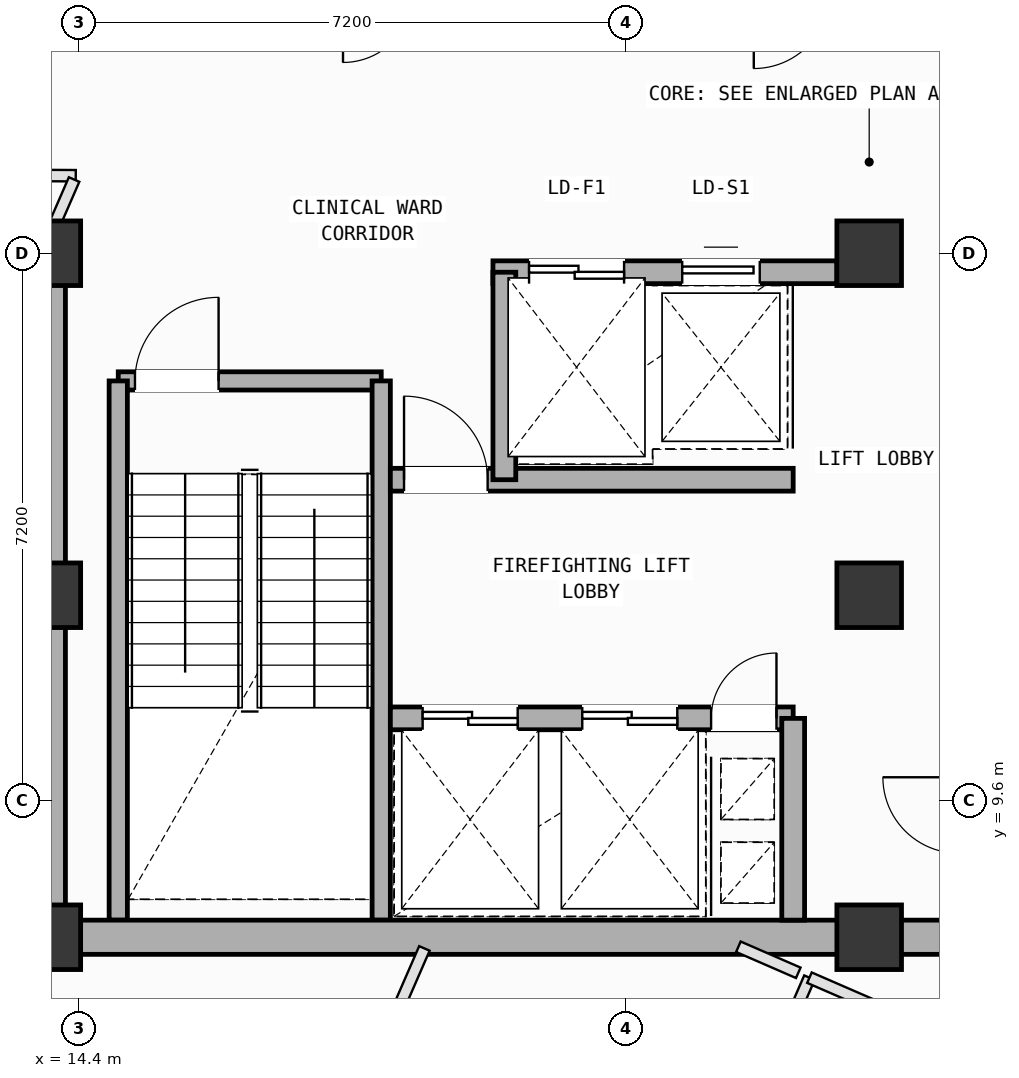
"""IFC4 building model, lengths in metres.
Left out: names, types, materials, properties, quantities, classifications, styles, units other than length and angle.
Written with IfcOpenShell. Run it as: python <this file> out.ifc"""

import sys

from ifc_helpers import new_model, si_unit, direction, frame, frame_2d, origin, origin_2d, place, context, subcontext, project, spatial, rectangle, extrude, element, fill, save


model = new_model("IFC4")
c1 = context("Model", 3, precision=1e-05, world=origin(), true_north=direction((0.0, 1.0)))
c2 = subcontext(c1, "Body", "Model", "MODEL_VIEW")
j1 = project(units=[si_unit("LENGTHUNIT", "METRE"), si_unit("PLANEANGLEUNIT", "RADIAN")], contexts=[c1])
p1 = place(None, origin())
s1 = spatial("IfcSite", under=j1, at=p1, CompositionType="ELEMENT")
p2 = place(p1, origin())
s2 = spatial("IfcBuilding", under=s1, at=p2, CompositionType="ELEMENT")
p3 = place(p2, frame((0.0, 0.0, 320.6)))
s3 = spatial("IfcBuildingStorey", under=s2, at=p3, CompositionType="ELEMENT", Elevation=320.6)
for number, where, z_axis, x_axis in (
    (1, (14.0, 7.8, 0.0), (0.0, 0.0, 1.0), (1.0, 0.0, 0.0)),
    (2, (14.0, 12.3, 0.0), (0.0, 0.0, 1.0), (1.0, 0.0, 0.0)),
    (3, (14.0, 16.8, 0.0), (0.0, 0.0, 1.0), (1.0, 0.0, 0.0)),
    (4, (24.8, 7.8, 0.0), (0.0, 0.0, 1.0), (1.0, 0.0, 0.0)),
    (5, (24.8, 12.3, 0.0), (0.0, 0.0, 1.0), (1.0, 0.0, 0.0)),
    (6, (24.8, 16.8, 0.0), (0.0, 0.0, 1.0), (1.0, 0.0, 0.0)),
):
    element("IfcColumn", number, at=place(p3, frame(where, z_axis=z_axis, x_axis=x_axis)), inside=s3, PredefinedType="COLUMN", context=c2, shape_type="SweptSolid", body=[
        extrude(rectangle(XDim=0.85, YDim=0.85, at=origin_2d()), origin(), (0.0, 0.0, 1.0), 4.0),
    ])
p4 = place(p3, frame((25.484, 21.187, 0.0), z_axis=(0.0, 0.0, 1.0), x_axis=(0.917060568388, -0.398747932794, 0.0)))
e7 = element("IfcWall", 7, at=p4, inside=s3, PredefinedType="SOLIDWALL", context=c2, shape_type="SweptSolid", body=[
    extrude(rectangle(XDim=6.955, YDim=0.28, at=frame_2d((3.478, 0.0))), origin(), (0.0, 0.0, 1.0), 2.765),
])
p5 = place(p3, frame((14.92, 15.12, 0.0), z_axis=(0.0, 0.0, 1.0), x_axis=(1.0, 0.0, 0.0)))
e8 = element("IfcWall", 8, at=p5, inside=s3, PredefinedType="SOLIDWALL", context=c2, shape_type="SweptSolid", body=[
    extrude(rectangle(XDim=3.46, YDim=0.24, at=frame_2d((1.73, 0.0))), origin(), (0.0, 0.0, 1.0), 3.78),
])
p6 = place(p5, frame((0.22, 0.0, 0.0)))
e9 = element("IfcOpeningElement", 9, at=p6, cuts=e8, PredefinedType="OPENING", context=c2, shape_type="SweptSolid", body=[
    extrude(rectangle(XDim=1.1, YDim=2.15, at=frame_2d((0.55, 1.075))), frame((0.0, 0.13, 0.0), z_axis=(0.0, -1.0, 0.0), x_axis=(1.0, 0.0, 0.0)), (0.0, 0.0, 1.0), 0.26),
])
for number, where, z_axis, x_axis in (
    (10, (18.38, 15.12, 0.0), (0.0, 0.0, 1.0), (0.0, -1.0, 0.0)),
    (11, (14.92, 8.025, 0.0), (0.0, 0.0, 1.0), (0.0, 1.0, 0.0)),
):
    element("IfcWall", number, at=place(p3, frame(where, z_axis=z_axis, x_axis=x_axis)), inside=s3, PredefinedType="SOLIDWALL", context=c2, shape_type="SweptSolid", body=[
        extrude(rectangle(XDim=7.095, YDim=0.24, at=frame_2d((3.548, 0.0))), origin(), (0.0, 0.0, 1.0), 3.78),
    ])
for number, where, z_axis, x_axis in (
    (12, (14.0, 7.8, 0.0), (0.0, 0.0, 1.0), (1.0, 0.0, 0.0)),
    (13, (24.8, 7.8, 0.0), (0.0, 0.0, 1.0), (1.0, 0.0, 0.0)),
):
    element("IfcWall", number, at=place(p3, frame(where, z_axis=z_axis, x_axis=x_axis)), inside=s3, PredefinedType="SHEAR", context=c2, shape_type="SweptSolid", body=[
        extrude(rectangle(XDim=10.8, YDim=0.45, at=frame_2d((5.4, 0.0))), origin(), (0.0, 0.0, 1.0), 3.78),
    ])
p7 = place(p3, frame((14.0, 16.8, 0.0), z_axis=(0.0, 0.0, 1.0), x_axis=(0.0, -1.0, 0.0)))
e14 = element("IfcWall", 14, at=p7, inside=s3, PredefinedType="SHEAR", context=c2, shape_type="SweptSolid", body=[
    extrude(rectangle(XDim=9.0, YDim=0.45, at=frame_2d((4.5, 0.0))), origin(), (0.0, 0.0, 1.0), 3.78),
])
p8 = place(p3, frame((19.85, 16.55, 0.0), z_axis=(0.0, 0.0, 1.0), x_axis=(1.0, 0.0, 0.0)))
e15 = element("IfcWall", 15, at=p8, inside=s3, PredefinedType="SOLIDWALL", context=c2, shape_type="SweptSolid", body=[
    extrude(rectangle(XDim=4.525, YDim=0.3, at=frame_2d((2.262, 0.0))), origin(), (0.0, 0.0, 1.0), 3.78),
])
p9 = place(p8, frame((0.475, 0.0, 0.0)))
e16 = element("IfcOpeningElement", 16, at=p9, cuts=e15, PredefinedType="OPENING", context=c2, shape_type="SweptSolid", body=[
    extrude(rectangle(XDim=1.25, YDim=2.18, at=frame_2d((0.625, 1.09))), frame((0.0, 0.16, 0.0), z_axis=(0.0, -1.0, 0.0), x_axis=(1.0, 0.0, 0.0)), (0.0, 0.0, 1.0), 0.32),
])
p10 = place(p8, frame((2.49, 0.0, 0.0)))
e17 = element("IfcOpeningElement", 17, at=p10, cuts=e15, PredefinedType="OPENING", context=c2, shape_type="SweptSolid", body=[
    extrude(rectangle(XDim=1.02, YDim=2.12, at=frame_2d((0.51, 1.06))), frame((0.0, 0.16, 0.0), z_axis=(0.0, -1.0, 0.0), x_axis=(1.0, 0.0, 0.0)), (0.0, 0.0, 1.0), 0.32),
])
p11 = place(p3, frame((18.5, 10.68, 0.0), z_axis=(0.0, 0.0, 1.0), x_axis=(1.0, 0.0, 0.0)))
e18 = element("IfcWall", 18, at=p11, inside=s3, PredefinedType="SOLIDWALL", context=c2, shape_type="SweptSolid", body=[
    extrude(rectangle(XDim=5.3, YDim=0.3, at=frame_2d((2.65, 0.0))), origin(), (0.0, 0.0, 1.0), 3.78),
])
p12 = place(p11, frame((4.22, 0.0, 0.0)))
e19 = element("IfcOpeningElement", 19, at=p12, cuts=e18, PredefinedType="OPENING", context=c2, shape_type="SweptSolid", body=[
    extrude(rectangle(XDim=0.86, YDim=2.06, at=frame_2d((0.43, 1.03))), frame((0.0, 0.16, 0.0), z_axis=(0.0, -1.0, 0.0), x_axis=(1.0, 0.0, 0.0)), (0.0, 0.0, 1.0), 0.32),
])
p13 = place(p11, frame((0.425, 0.0, 0.0)))
e20 = element("IfcOpeningElement", 20, at=p13, cuts=e18, PredefinedType="OPENING", context=c2, shape_type="SweptSolid", body=[
    extrude(rectangle(XDim=1.25, YDim=2.18, at=frame_2d((0.625, 1.09))), frame((0.0, 0.16, 0.0), z_axis=(0.0, -1.0, 0.0), x_axis=(1.0, 0.0, 0.0)), (0.0, 0.0, 1.0), 0.32),
])
p14 = place(p11, frame((2.525, 0.0, 0.0)))
e21 = element("IfcOpeningElement", 21, at=p14, cuts=e18, PredefinedType="OPENING", context=c2, shape_type="SweptSolid", body=[
    extrude(rectangle(XDim=1.25, YDim=2.18, at=frame_2d((0.625, 1.09))), frame((0.0, 0.16, 0.0), z_axis=(0.0, -1.0, 0.0), x_axis=(1.0, 0.0, 0.0)), (0.0, 0.0, 1.0), 0.32),
])
p15 = place(p3, frame((18.5, 13.82, 0.0), z_axis=(0.0, 0.0, 1.0), x_axis=(1.0, 0.0, 0.0)))
e22 = element("IfcWall", 22, at=p15, inside=s3, PredefinedType="SOLIDWALL", context=c2, shape_type="SweptSolid", body=[
    extrude(rectangle(XDim=5.3, YDim=0.3, at=frame_2d((2.65, 0.0))), origin(), (0.0, 0.0, 1.0), 3.78),
])
p16 = place(p15, frame((0.18, 0.0, 0.0)))
e23 = element("IfcOpeningElement", 23, at=p16, cuts=e22, PredefinedType="OPENING", context=c2, shape_type="SweptSolid", body=[
    extrude(rectangle(XDim=1.1, YDim=2.15, at=frame_2d((0.55, 1.075))), frame((0.0, 0.16, 0.0), z_axis=(0.0, -1.0, 0.0), x_axis=(1.0, 0.0, 0.0)), (0.0, 0.0, 1.0), 0.32),
])
p17 = place(p3, frame((23.8, 8.025, 0.0), z_axis=(0.0, 0.0, 1.0), x_axis=(0.0, 1.0, 0.0)))
e24 = element("IfcWall", 24, at=p17, inside=s3, PredefinedType="SOLIDWALL", context=c2, shape_type="SweptSolid", body=[
    extrude(rectangle(XDim=2.655, YDim=0.3, at=frame_2d((1.328, 0.0))), origin(), (0.0, 0.0, 1.0), 3.78),
])
p18 = place(p3, frame((20.0, 13.82, 0.0), z_axis=(0.0, 0.0, 1.0), x_axis=(0.0, 1.0, 0.0)))
e25 = element("IfcWall", 25, at=p18, inside=s3, PredefinedType="SOLIDWALL", context=c2, shape_type="SweptSolid", body=[
    extrude(rectangle(XDim=2.73, YDim=0.3, at=frame_2d((1.365, 0.0))), origin(), (0.0, 0.0, 1.0), 3.78),
])
p19 = place(p3, frame((20.912, 0.134, 0.0), z_axis=(0.0, 0.0, 1.0), x_axis=(0.398731849313, 0.917067561493, 0.0)))
e26 = element("IfcWall", 26, at=p19, inside=s3, PredefinedType="PARTITIONING", context=c2, shape_type="SweptSolid", body=[
    extrude(rectangle(XDim=7.779, YDim=0.15, at=frame_2d((3.89, 0.0))), origin(), (0.0, 0.0, 1.0), 2.765),
])
p20 = place(p19, frame((3.46, 0.0, 0.0)))
e27 = element("IfcOpeningElement", 27, at=p20, cuts=e26, PredefinedType="OPENING", context=c2, shape_type="SweptSolid", body=[
    extrude(rectangle(XDim=0.86, YDim=2.06, at=frame_2d((0.43, 1.03))), frame((0.0, 0.085, 0.0), z_axis=(0.0, -1.0, 0.0), x_axis=(1.0, 0.0, 0.0)), (0.0, 0.0, 1.0), 0.17),
])
p21 = place(p3, frame((24.014, 7.268, 0.0), z_axis=(0.0, 0.0, 1.0), x_axis=(0.91706671013, -0.398733807411, 0.0)))
e28 = element("IfcWall", 28, at=p21, inside=s3, PredefinedType="PARTITIONING", context=c2, shape_type="SweptSolid", body=[
    extrude(rectangle(XDim=4.64, YDim=0.15, at=frame_2d((2.32, 0.0))), origin(), (0.0, 0.0, 1.0), 3.78),
])
p22 = place(p21, frame((1.89, 0.0, 0.0)))
e29 = element("IfcOpeningElement", 29, at=p22, cuts=e28, PredefinedType="OPENING", context=c2, shape_type="SweptSolid", body=[
    extrude(rectangle(XDim=0.86, YDim=2.06, at=frame_2d((0.43, 1.03))), frame((0.0, 0.085, 0.0), z_axis=(0.0, -1.0, 0.0), x_axis=(1.0, 0.0, 0.0)), (0.0, 0.0, 1.0), 0.17),
])
p23 = place(p3, frame((16.647, 2.364, 0.0), z_axis=(0.0, 0.0, 1.0), x_axis=(0.398935045973, 0.916979186838, 0.0)))
e30 = element("IfcWall", 30, at=p23, inside=s3, PredefinedType="PARTITIONING", context=c2, shape_type="SweptSolid", body=[
    extrude(rectangle(XDim=5.768, YDim=0.15, at=frame_2d((2.884, 0.0))), origin(), (0.0, 0.0, 1.0), 3.78),
])
p24 = place(p23, frame((2.37, 0.0, 0.0)))
e31 = element("IfcOpeningElement", 31, at=p24, cuts=e30, PredefinedType="OPENING", context=c2, shape_type="SweptSolid", body=[
    extrude(rectangle(XDim=0.86, YDim=2.06, at=frame_2d((0.43, 1.03))), frame((0.0, 0.085, 0.0), z_axis=(0.0, -1.0, 0.0), x_axis=(1.0, 0.0, 0.0)), (0.0, 0.0, 1.0), 0.17),
])
p25 = place(p3, frame((23.079, 7.675, 0.0), z_axis=(0.0, 0.0, 1.0), x_axis=(0.91686666905, -0.399193576082, 0.0)))
e32 = element("IfcWall", 32, at=p25, inside=s3, PredefinedType="PARTITIONING", context=c2, shape_type="SweptSolid", body=[
    extrude(rectangle(XDim=0.859, YDim=0.15, at=frame_2d((0.43, 0.0))), origin(), (0.0, 0.0, 1.0), 3.78),
])
p26 = place(p3, frame((12.527, 17.831, 0.0), z_axis=(0.0, 0.0, 1.0), x_axis=(0.999982057945, -0.005990307855, 0.0)))
e33 = element("IfcWall", 33, at=p26, inside=s3, PredefinedType="PARTITIONING", context=c2, shape_type="SweptSolid", body=[
    extrude(rectangle(XDim=1.834, YDim=0.15, at=frame_2d((0.917, 0.0))), origin(), (0.0, 0.0, 1.0), 3.78),
])
p27 = place(p3, frame((14.339, 17.77, 0.0), z_axis=(0.0, 0.0, 1.0), x_axis=(-0.399140640041, -0.916889714997, 0.0)))
e34 = element("IfcWall", 34, at=p27, inside=s3, PredefinedType="PARTITIONING", context=c2, shape_type="SweptSolid", body=[
    extrude(rectangle(XDim=0.84, YDim=0.15, at=frame_2d((0.42, 0.0))), origin(), (0.0, 0.0, 1.0), 2.765),
])
p28 = place(p6, origin())
e35 = element("IfcDoor", 35, at=p28, inside=s3, OperationType="SINGLE_SWING_RIGHT", PredefinedType="DOOR", context=c2, shape_type="SweptSolid", body=[
    extrude(rectangle(XDim=1.1, YDim=2.15, at=frame_2d((0.55, 1.075))), frame((0.0, 0.025, 0.0), z_axis=(0.0, -1.0, 0.0), x_axis=(1.0, 0.0, 0.0)), (0.0, 0.0, 1.0), 0.05),
])
fill(e9, e35)
p29 = place(p12, origin())
e36 = element("IfcDoor", 36, at=p29, inside=s3, OperationType="SINGLE_SWING_RIGHT", PredefinedType="DOOR", context=c2, shape_type="SweptSolid", body=[
    extrude(rectangle(XDim=0.86, YDim=2.06, at=frame_2d((0.43, 1.03))), frame((0.0, 0.025, 0.0), z_axis=(0.0, -1.0, 0.0), x_axis=(1.0, 0.0, 0.0)), (0.0, 0.0, 1.0), 0.05),
])
fill(e19, e36)
p30 = place(p16, origin())
e37 = element("IfcDoor", 37, at=p30, inside=s3, OperationType="SINGLE_SWING_LEFT", PredefinedType="DOOR", context=c2, shape_type="SweptSolid", body=[
    extrude(rectangle(XDim=1.1, YDim=2.15, at=frame_2d((0.55, 1.075))), frame((0.0, 0.025, 0.0), z_axis=(0.0, -1.0, 0.0), x_axis=(1.0, 0.0, 0.0)), (0.0, 0.0, 1.0), 0.05),
])
fill(e23, e37)
p31 = place(p13, origin())
e38 = element("IfcDoor", 38, at=p31, inside=s3, OperationType="DOUBLE_DOOR_SLIDING", PredefinedType="DOOR", context=c2, shape_type="SweptSolid", body=[
    extrude(rectangle(XDim=1.25, YDim=2.18, at=frame_2d((0.625, 1.09))), frame((0.0, 0.025, 0.0), z_axis=(0.0, -1.0, 0.0), x_axis=(1.0, 0.0, 0.0)), (0.0, 0.0, 1.0), 0.05),
])
fill(e20, e38)
p32 = place(p14, origin())
e39 = element("IfcDoor", 39, at=p32, inside=s3, OperationType="DOUBLE_DOOR_SLIDING", PredefinedType="DOOR", context=c2, shape_type="SweptSolid", body=[
    extrude(rectangle(XDim=1.25, YDim=2.18, at=frame_2d((0.625, 1.09))), frame((0.0, 0.025, 0.0), z_axis=(0.0, -1.0, 0.0), x_axis=(1.0, 0.0, 0.0)), (0.0, 0.0, 1.0), 0.05),
])
fill(e21, e39)
p33 = place(p9, origin())
e40 = element("IfcDoor", 40, at=p33, inside=s3, OperationType="DOUBLE_DOOR_SLIDING", PredefinedType="DOOR", context=c2, shape_type="SweptSolid", body=[
    extrude(rectangle(XDim=1.25, YDim=2.18, at=frame_2d((0.625, 1.09))), frame((0.0, 0.025, 0.0), z_axis=(0.0, -1.0, 0.0), x_axis=(1.0, 0.0, 0.0)), (0.0, 0.0, 1.0), 0.05),
])
fill(e16, e40)
p34 = place(p10, origin())
e41 = element("IfcDoor", 41, at=p34, inside=s3, OperationType="SLIDING_TO_LEFT", PredefinedType="DOOR", context=c2, shape_type="SweptSolid", body=[
    extrude(rectangle(XDim=1.02, YDim=2.12, at=frame_2d((0.51, 1.06))), frame((0.0, 0.025, 0.0), z_axis=(0.0, -1.0, 0.0), x_axis=(1.0, 0.0, 0.0)), (0.0, 0.0, 1.0), 0.05),
])
fill(e17, e41)
save(model, sys.argv[1])
